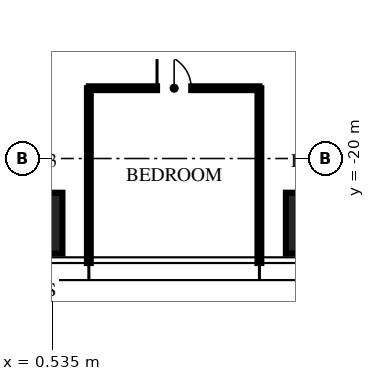
"""IFC4 building model, lengths in metres.
Left out: names, types, materials, properties, quantities, classifications, styles, units other than length and angle.
Written with IfcOpenShell. Run it as: python <this file> out.ifc"""

import sys

from ifc_helpers import new_model, si_unit, direction, frame, frame_2d, origin, origin_2d, place, context, subcontext, project, spatial, rectangle, extrude, element, fill, save


model = new_model("IFC4")
c1 = context("Model", 3, precision=1e-05, world=origin(), true_north=direction((0.0, 1.0)))
c2 = subcontext(c1, "Body", "Model", "MODEL_VIEW")
j1 = project(units=[si_unit("LENGTHUNIT", "METRE"), si_unit("PLANEANGLEUNIT", "RADIAN")], contexts=[c1])
p1 = place(None, origin())
s1 = spatial("IfcSite", under=j1, at=p1, CompositionType="ELEMENT")
p2 = place(p1, origin())
s2 = spatial("IfcBuilding", under=s1, at=p2, CompositionType="ELEMENT")
p3 = place(p2, frame((0.0, 0.0, 349.5)))
s3 = spatial("IfcBuildingStorey", under=s2, at=p3, CompositionType="ELEMENT", Elevation=349.5)
for number, where, z_axis, x_axis in (
    (1, (7.48, -21.7, 0.0), (0.0, 0.0, 1.0), (1.0, 0.0, 0.0)),
    (2, (0.0, -21.7, 0.0), (0.0, 0.0, 1.0), (1.0, 0.0, 0.0)),
):
    element("IfcColumn", number, at=place(p3, frame(where, z_axis=z_axis, x_axis=x_axis)), inside=s3, PredefinedType="COLUMN", context=c2, shape_type="SweptSolid", body=[
        extrude(rectangle(XDim=1.6, YDim=1.6, at=origin_2d()), origin(), (0.0, 0.0, 1.0), 3.75),
    ])
for number, where, z_axis, x_axis in (
    (3, (1.496, -18.15, 0.0), (0.0, 0.0, 1.0), (0.0, -1.0, 0.0)),
    (4, (5.984, -18.15, 0.0), (0.0, 0.0, 1.0), (0.0, -1.0, 0.0)),
):
    element("IfcWall", number, at=place(p3, frame(where, z_axis=z_axis, x_axis=x_axis)), inside=s3, PredefinedType="PARTITIONING", context=c2, shape_type="SweptSolid", body=[
        extrude(rectangle(XDim=4.6, YDim=0.1, at=frame_2d((2.3, 0.0))), origin(), (0.0, 0.0, 1.0), 2.85),
    ])
p4 = place(p3, frame((1.496, -18.15, 0.0), z_axis=(0.0, 0.0, 1.0), x_axis=(1.0, 0.0, 0.0)))
e5 = element("IfcWall", 5, at=p4, inside=s3, PredefinedType="PARTITIONING", context=c2, shape_type="SweptSolid", body=[
    extrude(rectangle(XDim=4.488, YDim=0.1, at=frame_2d((2.244, 0.0))), origin(), (0.0, 0.0, 1.0), 2.56),
])
p5 = place(p4, frame((1.794, 0.0, 0.0)))
e6 = element("IfcOpeningElement", 6, at=p5, cuts=e5, PredefinedType="OPENING", context=c2, shape_type="SweptSolid", body=[
    extrude(rectangle(XDim=0.9, YDim=2.1, at=frame_2d((0.45, 1.05))), frame((0.0, 0.06, 0.0), z_axis=(0.0, -1.0, 0.0), x_axis=(1.0, 0.0, 0.0)), (0.0, 0.0, 1.0), 0.12),
])
p6 = place(p5, origin())
e7 = element("IfcDoor", 7, at=p6, inside=s3, OperationType="SINGLE_SWING_LEFT", PredefinedType="DOOR", context=c2, shape_type="SweptSolid", body=[
    extrude(rectangle(XDim=0.9, YDim=2.1, at=frame_2d((0.45, 1.05))), frame((0.0, 0.025, 0.0), z_axis=(0.0, -1.0, 0.0), x_axis=(1.0, 0.0, 0.0)), (0.0, 0.0, 1.0), 0.05),
])
fill(e6, e7)
save(model, sys.argv[1])
